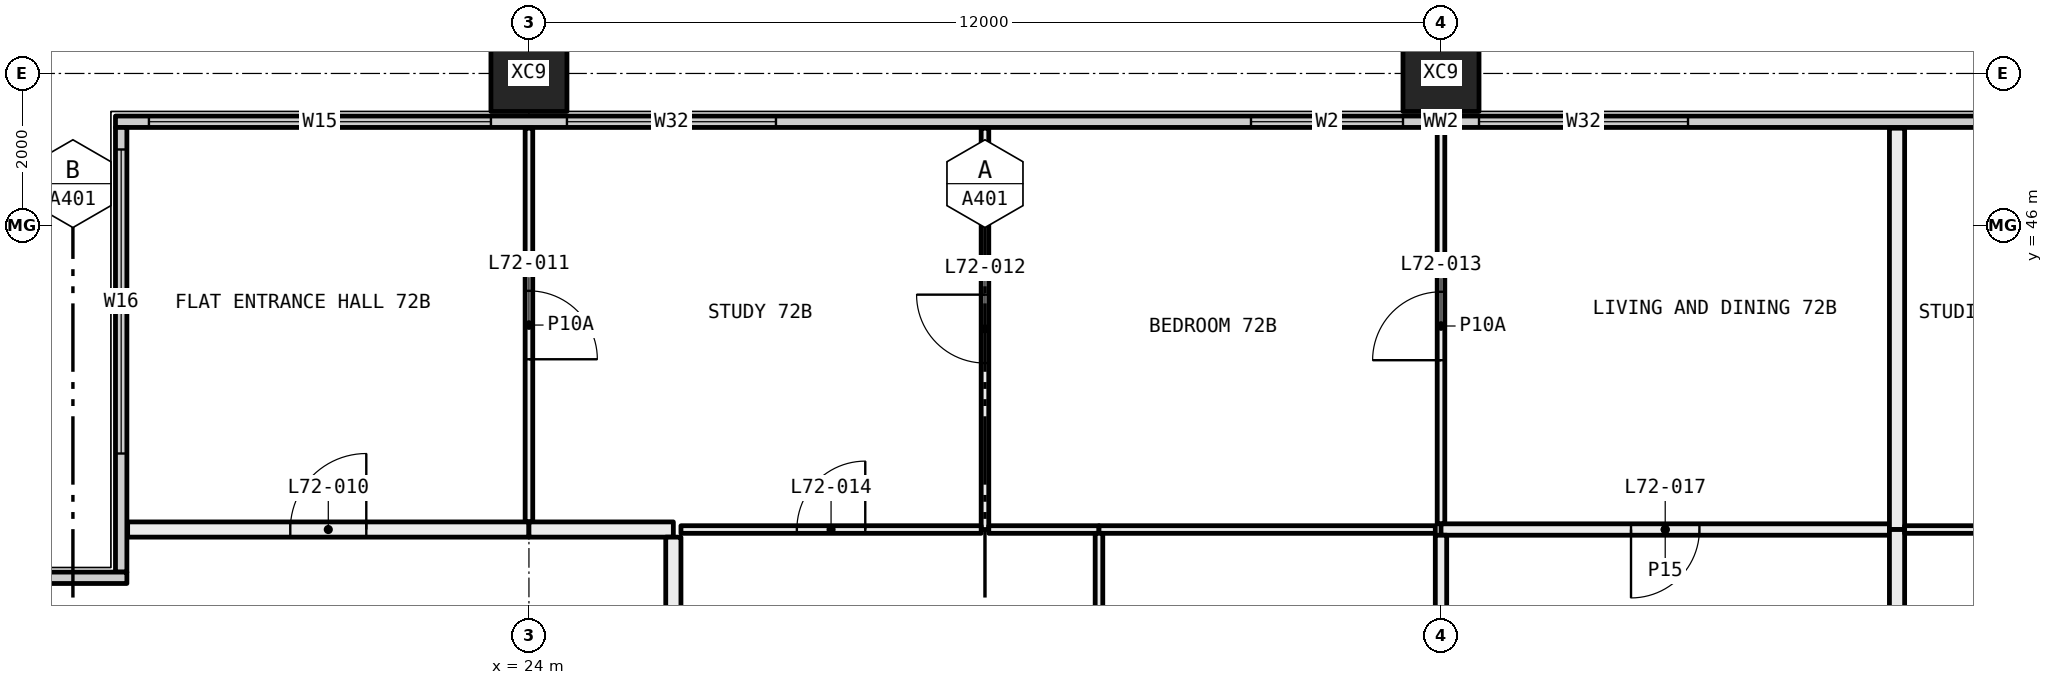
"""IFC4 building model, lengths in metres.
Left out: names, types, materials, properties, quantities, classifications, styles, units other than length and angle.
Written with IfcOpenShell. Run it as: python <this file> out.ifc"""

import sys

from ifc_helpers import new_model, si_unit, direction, frame, frame_2d, origin, origin_2d, place, context, subcontext, project, spatial, rectangle, hollow_rectangle, extrude, element, fill, save


model = new_model("IFC4")
c1 = context("Model", 3, precision=1e-05, world=origin(), true_north=direction((0.0, 1.0)))
c2 = subcontext(c1, "Body", "Model", "MODEL_VIEW")
j1 = project(units=[si_unit("LENGTHUNIT", "METRE"), si_unit("PLANEANGLEUNIT", "RADIAN")], contexts=[c1])
p1 = place(None, origin())
s1 = spatial("IfcSite", under=j1, at=p1, CompositionType="ELEMENT")
p2 = place(p1, origin())
s2 = spatial("IfcBuilding", under=s1, at=p2, CompositionType="ELEMENT")
p3 = place(p2, frame((0.0, 0.0, 266.25)))
s3 = spatial("IfcBuildingStorey", under=s2, at=p3, CompositionType="ELEMENT", Elevation=266.25)
for number, where, z_axis, x_axis in (
    (1, (24.0, 48.0, -0.4), (0.0, 0.0, 1.0), (1.0, 0.0, 0.0)),
    (2, (36.0, 48.0, -0.4), (0.0, 0.0, 1.0), (1.0, 0.0, 0.0)),
):
    element("IfcColumn", number, at=place(p3, frame(where, z_axis=z_axis, x_axis=x_axis)), inside=s3, PredefinedType="COLUMN", context=c2, shape_type="SweptSolid", body=[
        extrude(hollow_rectangle(XDim=1.0, YDim=1.0, WallThickness=0.036, at=origin_2d()), origin(), (0.0, 0.0, 1.0), 3.45),
    ])
p4 = place(p3, frame((18.56, 47.365, 0.0), z_axis=(0.0, 0.0, 1.0), x_axis=(1.0, 0.0, 0.0)))
e3 = element("IfcWall", 3, at=p4, inside=s3, PredefinedType="ELEMENTEDWALL", context=c2, shape_type="SweptSolid", body=[
    extrude(rectangle(XDim=34.88, YDim=0.15, at=frame_2d((17.44, 0.0))), origin(), (0.0, 0.0, 1.0), 3.05),
])
p5 = place(p4, frame((0.44, 0.0, 0.45)))
e4 = element("IfcOpeningElement", 4, at=p5, cuts=e3, PredefinedType="OPENING", context=c2, shape_type="SweptSolid", body=[
    extrude(rectangle(XDim=4.5, YDim=2.55, at=frame_2d((2.25, 1.275))), frame((0.0, 0.085, 0.0), z_axis=(0.0, -1.0, 0.0), x_axis=(1.0, 0.0, 0.0)), (0.0, 0.0, 1.0), 0.17),
])
p6 = place(p4, frame((5.94, 0.0, 0.45)))
e5 = element("IfcOpeningElement", 5, at=p6, cuts=e3, PredefinedType="OPENING", context=c2, shape_type="SweptSolid", body=[
    extrude(rectangle(XDim=2.75, YDim=2.55, at=frame_2d((1.375, 1.275))), frame((0.0, 0.085, 0.0), z_axis=(0.0, -1.0, 0.0), x_axis=(1.0, 0.0, 0.0)), (0.0, 0.0, 1.0), 0.17),
])
p7 = place(p4, frame((14.94, 0.0, 0.45)))
e6 = element("IfcOpeningElement", 6, at=p7, cuts=e3, PredefinedType="OPENING", context=c2, shape_type="SweptSolid", body=[
    extrude(rectangle(XDim=2.0, YDim=2.55, at=frame_2d((1.0, 1.275))), frame((0.0, 0.085, 0.0), z_axis=(0.0, -1.0, 0.0), x_axis=(1.0, 0.0, 0.0)), (0.0, 0.0, 1.0), 0.17),
])
p8 = place(p4, frame((17.94, 0.0, 0.45)))
e7 = element("IfcOpeningElement", 7, at=p8, cuts=e3, PredefinedType="OPENING", context=c2, shape_type="SweptSolid", body=[
    extrude(rectangle(XDim=2.75, YDim=2.55, at=frame_2d((1.375, 1.275))), frame((0.0, 0.085, 0.0), z_axis=(0.0, -1.0, 0.0), x_axis=(1.0, 0.0, 0.0)), (0.0, 0.0, 1.0), 0.17),
])
p9 = place(p4, frame((26.19, 0.0, 0.45)))
e8 = element("IfcOpeningElement", 8, at=p9, cuts=e3, PredefinedType="OPENING", context=c2, shape_type="SweptSolid", body=[
    extrude(rectangle(XDim=2.75, YDim=2.55, at=frame_2d((1.375, 1.275))), frame((0.0, 0.085, 0.0), z_axis=(0.0, -1.0, 0.0), x_axis=(1.0, 0.0, 0.0)), (0.0, 0.0, 1.0), 0.17),
])
p10 = place(p4, frame((29.94, 0.0, 0.45)))
e9 = element("IfcOpeningElement", 9, at=p10, cuts=e3, PredefinedType="OPENING", context=c2, shape_type="SweptSolid", body=[
    extrude(rectangle(XDim=4.5, YDim=2.55, at=frame_2d((2.25, 1.275))), frame((0.0, 0.085, 0.0), z_axis=(0.0, -1.0, 0.0), x_axis=(1.0, 0.0, 0.0)), (0.0, 0.0, 1.0), 0.17),
])
p11 = place(p3, frame((18.635, 41.44, 0.0), z_axis=(0.0, 0.0, 1.0), x_axis=(0.0, 1.0, 0.0)))
e10 = element("IfcWall", 10, at=p11, inside=s3, PredefinedType="ELEMENTEDWALL", context=c2, shape_type="SweptSolid", body=[
    extrude(rectangle(XDim=5.85, YDim=0.15, at=frame_2d((2.925, 0.0))), origin(), (0.0, 0.0, 1.0), 3.05),
])
p12 = place(p11, frame((1.56, 0.0, 0.45)))
e11 = element("IfcOpeningElement", 11, at=p12, cuts=e10, PredefinedType="OPENING", context=c2, shape_type="SweptSolid", body=[
    extrude(rectangle(XDim=4.0, YDim=2.55, at=frame_2d((2.0, 1.275))), frame((0.0, 0.085, 0.0), z_axis=(0.0, -1.0, 0.0), x_axis=(1.0, 0.0, 0.0)), (0.0, 0.0, 1.0), 0.17),
])
p13 = place(p3, frame((12.56, 41.365, 0.0), z_axis=(0.0, 0.0, 1.0), x_axis=(1.0, 0.0, 0.0)))
e12 = element("IfcWall", 12, at=p13, inside=s3, PredefinedType="ELEMENTEDWALL", context=c2, shape_type="SweptSolid", body=[
    extrude(rectangle(XDim=6.15, YDim=0.15, at=frame_2d((3.075, 0.0))), origin(), (0.0, 0.0, 1.0), 3.05),
])
p14 = place(p13, frame((0.44, 0.0, 0.45)))
e13 = element("IfcOpeningElement", 13, at=p14, cuts=e12, PredefinedType="OPENING", context=c2, shape_type="SweptSolid", body=[
    extrude(rectangle(XDim=4.0, YDim=2.55, at=frame_2d((2.0, 1.275))), frame((0.0, 0.085, 0.0), z_axis=(0.0, -1.0, 0.0), x_axis=(1.0, 0.0, 0.0)), (0.0, 0.0, 1.0), 0.17),
])
p15 = place(p3, frame((24.0, 42.1, 0.0), z_axis=(0.0, 0.0, 1.0), x_axis=(0.0, 1.0, 0.0)))
e14 = element("IfcWall", 14, at=p15, inside=s3, PredefinedType="PARTITIONING", context=c2, shape_type="SweptSolid", body=[
    extrude(rectangle(XDim=5.18, YDim=0.1, at=frame_2d((2.59, 0.0))), origin(), (0.0, 0.0, 1.0), 3.05),
])
p16 = place(p15, frame((2.14, 0.0, 0.0)))
e15 = element("IfcOpeningElement", 15, at=p16, cuts=e14, PredefinedType="OPENING", context=c2, shape_type="SweptSolid", body=[
    extrude(rectangle(XDim=0.9, YDim=2.1, at=frame_2d((0.45, 1.05))), frame((0.0, 0.06, 0.0), z_axis=(0.0, -1.0, 0.0), x_axis=(1.0, 0.0, 0.0)), (0.0, 0.0, 1.0), 0.12),
])
p17 = place(p3, frame((18.72, 42.0, 0.0), z_axis=(0.0, 0.0, 1.0), x_axis=(1.0, 0.0, 0.0)))
e16 = element("IfcWall", 16, at=p17, inside=s3, PredefinedType="PARTITIONING", context=c2, shape_type="SweptSolid", body=[
    extrude(rectangle(XDim=5.28, YDim=0.2, at=frame_2d((2.64, 0.0))), origin(), (0.0, 0.0, 1.0), 3.05),
])
p18 = place(p17, frame((2.14, 0.0, 0.0)))
e17 = element("IfcOpeningElement", 17, at=p18, cuts=e16, PredefinedType="OPENING", context=c2, shape_type="SweptSolid", body=[
    extrude(rectangle(XDim=1.0, YDim=2.1, at=frame_2d((0.5, 1.05))), frame((0.0, 0.11, 0.0), z_axis=(0.0, -1.0, 0.0), x_axis=(1.0, 0.0, 0.0)), (0.0, 0.0, 1.0), 0.22),
])
p19 = place(p3, frame((30.0, 42.0, 0.0), z_axis=(0.0, 0.0, 1.0), x_axis=(0.0, 1.0, 0.0)))
e18 = element("IfcWall", 18, at=p19, inside=s3, PredefinedType="PARTITIONING", context=c2, shape_type="SweptSolid", body=[
    extrude(rectangle(XDim=5.28, YDim=0.1, at=frame_2d((2.64, 0.0))), origin(), (0.0, 0.0, 1.0), 3.05),
])
p20 = place(p19, frame((2.19, 0.0, 0.0)))
e19 = element("IfcOpeningElement", 19, at=p20, cuts=e18, PredefinedType="OPENING", context=c2, shape_type="SweptSolid", body=[
    extrude(rectangle(XDim=0.9, YDim=2.1, at=frame_2d((0.45, 1.05))), frame((0.0, 0.06, 0.0), z_axis=(0.0, -1.0, 0.0), x_axis=(1.0, 0.0, 0.0)), (0.0, 0.0, 1.0), 0.12),
])
p21 = place(p3, frame((26.0, 42.0, 0.0), z_axis=(0.0, 0.0, 1.0), x_axis=(1.0, 0.0, 0.0)))
e20 = element("IfcWall", 20, at=p21, inside=s3, PredefinedType="PARTITIONING", context=c2, shape_type="SweptSolid", body=[
    extrude(rectangle(XDim=3.95, YDim=0.1, at=frame_2d((1.975, 0.0))), origin(), (0.0, 0.0, 1.0), 3.05),
])
p22 = place(p21, frame((1.525, 0.0, 0.0)))
e21 = element("IfcOpeningElement", 21, at=p22, cuts=e20, PredefinedType="OPENING", context=c2, shape_type="SweptSolid", body=[
    extrude(rectangle(XDim=0.9, YDim=2.1, at=frame_2d((0.45, 1.05))), frame((0.0, 0.06, 0.0), z_axis=(0.0, -1.0, 0.0), x_axis=(1.0, 0.0, 0.0)), (0.0, 0.0, 1.0), 0.12),
])
p23 = place(p3, frame((24.0, 42.0, 0.0), z_axis=(0.0, 0.0, 1.0), x_axis=(1.0, 0.0, 0.0)))
e22 = element("IfcWall", 22, at=p23, inside=s3, PredefinedType="PARTITIONING", context=c2, shape_type="SweptSolid", body=[
    extrude(rectangle(XDim=1.9, YDim=0.2, at=frame_2d((0.95, 0.0))), origin(), (0.0, 0.0, 1.0), 3.05),
])
p24 = place(p3, frame((36.0, 42.075, 0.0), z_axis=(0.0, 0.0, 1.0), x_axis=(0.0, 1.0, 0.0)))
e23 = element("IfcWall", 23, at=p24, inside=s3, PredefinedType="PARTITIONING", context=c2, shape_type="SweptSolid", body=[
    extrude(rectangle(XDim=5.205, YDim=0.1, at=frame_2d((2.603, 0.0))), origin(), (0.0, 0.0, 1.0), 2.45),
])
p25 = place(p24, frame((2.153, 0.0, 0.0)))
e24 = element("IfcOpeningElement", 24, at=p25, cuts=e23, PredefinedType="OPENING", context=c2, shape_type="SweptSolid", body=[
    extrude(rectangle(XDim=0.9, YDim=2.1, at=frame_2d((0.45, 1.05))), frame((0.0, 0.06, 0.0), z_axis=(0.0, -1.0, 0.0), x_axis=(1.0, 0.0, 0.0)), (0.0, 0.0, 1.0), 0.12),
])
p26 = place(p3, frame((30.05, 42.0, 0.0), z_axis=(0.0, 0.0, 1.0), x_axis=(1.0, 0.0, 0.0)))
e25 = element("IfcWall", 25, at=p26, inside=s3, PredefinedType="PARTITIONING", context=c2, shape_type="SweptSolid", body=[
    extrude(rectangle(XDim=1.45, YDim=0.1, at=frame_2d((0.725, 0.0))), origin(), (0.0, 0.0, 1.0), 3.05),
])
p27 = place(p3, frame((31.5, 42.0, 0.0), z_axis=(0.0, 0.0, 1.0), x_axis=(1.0, 0.0, 0.0)))
e26 = element("IfcWall", 26, at=p27, inside=s3, PredefinedType="PARTITIONING", context=c2, shape_type="SweptSolid", body=[
    extrude(rectangle(XDim=4.425, YDim=0.1, at=frame_2d((2.212, 0.0))), origin(), (0.0, 0.0, 1.0), 2.45),
])
p28 = place(p3, frame((36.0, 42.0, 0.0), z_axis=(0.0, 0.0, 1.0), x_axis=(1.0, 0.0, 0.0)))
e27 = element("IfcWall", 27, at=p28, inside=s3, PredefinedType="PARTITIONING", context=c2, shape_type="SweptSolid", body=[
    extrude(rectangle(XDim=5.9, YDim=0.15, at=frame_2d((2.95, 0.0))), origin(), (0.0, 0.0, 1.0), 2.45),
])
p29 = place(p28, frame((2.5, 0.0, 0.0)))
e28 = element("IfcOpeningElement", 28, at=p29, cuts=e27, PredefinedType="OPENING", context=c2, shape_type="SweptSolid", body=[
    extrude(rectangle(XDim=0.9, YDim=2.1, at=frame_2d((0.45, 1.05))), frame((0.0, 0.085, 0.0), z_axis=(0.0, -1.0, 0.0), x_axis=(1.0, 0.0, 0.0)), (0.0, 0.0, 1.0), 0.17),
])
p30 = place(p3, frame((42.0, 42.0, 0.0), z_axis=(0.0, 0.0, 1.0), x_axis=(0.0, 1.0, 0.0)))
e29 = element("IfcWall", 29, at=p30, inside=s3, PredefinedType="PARTITIONING", context=c2, shape_type="SweptSolid", body=[
    extrude(rectangle(XDim=5.28, YDim=0.2, at=frame_2d((2.64, 0.0))), origin(), (0.0, 0.0, 1.0), 3.05),
])
p31 = place(p3, frame((31.5, 36.1, 0.0), z_axis=(0.0, 0.0, 1.0), x_axis=(0.0, 1.0, 0.0)))
e30 = element("IfcWall", 30, at=p31, inside=s3, PredefinedType="PARTITIONING", context=c2, shape_type="SweptSolid", body=[
    extrude(rectangle(XDim=5.85, YDim=0.1, at=frame_2d((2.925, 0.0))), origin(), (0.0, 0.0, 1.0), 3.05),
])
p32 = place(p31, frame((2.475, 0.0, 0.0)))
e31 = element("IfcOpeningElement", 31, at=p32, cuts=e30, PredefinedType="OPENING", context=c2, shape_type="SweptSolid", body=[
    extrude(rectangle(XDim=0.9, YDim=2.1, at=frame_2d((0.45, 1.05))), frame((0.0, 0.06, 0.0), z_axis=(0.0, -1.0, 0.0), x_axis=(1.0, 0.0, 0.0)), (0.0, 0.0, 1.0), 0.12),
])
p33 = place(p3, frame((25.9, 41.9, 0.0), z_axis=(0.0, 0.0, 1.0), x_axis=(0.0, -1.0, 0.0)))
e32 = element("IfcWall", 32, at=p33, inside=s3, PredefinedType="PARTITIONING", context=c2, shape_type="SweptSolid", body=[
    extrude(rectangle(XDim=6.2, YDim=0.2, at=frame_2d((3.1, 0.0))), origin(), (0.0, 0.0, 1.0), 2.45),
])
p34 = place(p3, frame((36.0, 38.1, 0.0), z_axis=(0.0, 0.0, 1.0), x_axis=(0.0, 1.0, 0.0)))
e33 = element("IfcWall", 33, at=p34, inside=s3, PredefinedType="PARTITIONING", context=c2, shape_type="SweptSolid", body=[
    extrude(rectangle(XDim=3.825, YDim=0.15, at=frame_2d((1.913, 0.0))), origin(), (0.0, 0.0, 1.0), 2.45),
])
p35 = place(p3, frame((42.0, 38.1, 0.0), z_axis=(0.0, 0.0, 1.0), x_axis=(0.0, 1.0, 0.0)))
e34 = element("IfcWall", 34, at=p35, inside=s3, PredefinedType="PARTITIONING", context=c2, shape_type="SweptSolid", body=[
    extrude(rectangle(XDim=3.9, YDim=0.2, at=frame_2d((1.95, 0.0))), origin(), (0.0, 0.0, 1.0), 3.05),
])
p36 = place(p3, frame((42.1, 42.0, 0.0), z_axis=(0.0, 0.0, 1.0), x_axis=(1.0, 0.0, 0.0)))
e35 = element("IfcWall", 35, at=p36, inside=s3, PredefinedType="PARTITIONING", context=c2, shape_type="SweptSolid", body=[
    extrude(rectangle(XDim=3.9, YDim=0.1, at=frame_2d((1.95, 0.0))), origin(), (0.0, 0.0, 1.0), 3.05),
])
p37 = place(p36, frame((1.5, 0.0, 0.0)))
e36 = element("IfcOpeningElement", 36, at=p37, cuts=e35, PredefinedType="OPENING", context=c2, shape_type="SweptSolid", body=[
    extrude(rectangle(XDim=0.9, YDim=2.1, at=frame_2d((0.45, 1.05))), frame((0.0, 0.06, 0.0), z_axis=(0.0, -1.0, 0.0), x_axis=(1.0, 0.0, 0.0)), (0.0, 0.0, 1.0), 0.12),
])
p38 = place(p5, origin())
e37 = element("IfcWindow", 37, at=p38, inside=s3, PartitioningType="SINGLE_PANEL", PredefinedType="WINDOW", context=c2, shape_type="SweptSolid", body=[
    extrude(rectangle(XDim=4.5, YDim=2.55, at=frame_2d((2.25, 1.275))), frame((0.0, 0.03, 0.0), z_axis=(0.0, -1.0, 0.0), x_axis=(1.0, 0.0, 0.0)), (0.0, 0.0, 1.0), 0.06),
])
fill(e4, e37)
p39 = place(p6, origin())
e38 = element("IfcWindow", 38, at=p39, inside=s3, PartitioningType="SINGLE_PANEL", PredefinedType="WINDOW", context=c2, shape_type="SweptSolid", body=[
    extrude(rectangle(XDim=2.75, YDim=2.55, at=frame_2d((1.375, 1.275))), frame((0.0, 0.03, 0.0), z_axis=(0.0, -1.0, 0.0), x_axis=(1.0, 0.0, 0.0)), (0.0, 0.0, 1.0), 0.06),
])
fill(e5, e38)
p40 = place(p7, origin())
e39 = element("IfcWindow", 39, at=p40, inside=s3, PartitioningType="SINGLE_PANEL", PredefinedType="WINDOW", context=c2, shape_type="SweptSolid", body=[
    extrude(rectangle(XDim=2.0, YDim=2.55, at=frame_2d((1.0, 1.275))), frame((0.0, 0.03, 0.0), z_axis=(0.0, -1.0, 0.0), x_axis=(1.0, 0.0, 0.0)), (0.0, 0.0, 1.0), 0.06),
])
fill(e6, e39)
p41 = place(p8, origin())
e40 = element("IfcWindow", 40, at=p41, inside=s3, PartitioningType="SINGLE_PANEL", PredefinedType="WINDOW", context=c2, shape_type="SweptSolid", body=[
    extrude(rectangle(XDim=2.75, YDim=2.55, at=frame_2d((1.375, 1.275))), frame((0.0, 0.03, 0.0), z_axis=(0.0, -1.0, 0.0), x_axis=(1.0, 0.0, 0.0)), (0.0, 0.0, 1.0), 0.06),
])
fill(e7, e40)
p42 = place(p12, origin())
e41 = element("IfcWindow", 41, at=p42, inside=s3, PartitioningType="SINGLE_PANEL", PredefinedType="WINDOW", context=c2, shape_type="SweptSolid", body=[
    extrude(rectangle(XDim=4.0, YDim=2.55, at=frame_2d((2.0, 1.275))), frame((0.0, 0.03, 0.0), z_axis=(0.0, -1.0, 0.0), x_axis=(1.0, 0.0, 0.0)), (0.0, 0.0, 1.0), 0.06),
])
fill(e11, e41)
p43 = place(p18, origin())
e42 = element("IfcDoor", 42, at=p43, inside=s3, OperationType="SINGLE_SWING_LEFT", PredefinedType="DOOR", context=c2, shape_type="SweptSolid", body=[
    extrude(rectangle(XDim=1.0, YDim=2.1, at=frame_2d((0.5, 1.05))), frame((0.0, 0.025, 0.0), z_axis=(0.0, -1.0, 0.0), x_axis=(1.0, 0.0, 0.0)), (0.0, 0.0, 1.0), 0.05),
])
fill(e17, e42)
p44 = place(p16, frame((0.9, 0.0, 0.0), x_axis=(-1.0, 0.0, 0.0)))
e43 = element("IfcDoor", 43, at=p44, inside=s3, OperationType="SINGLE_SWING_LEFT", PredefinedType="DOOR", context=c2, shape_type="SweptSolid", body=[
    extrude(rectangle(XDim=0.9, YDim=2.1, at=frame_2d((0.45, 1.05))), frame((0.0, 0.025, 0.0), z_axis=(0.0, -1.0, 0.0), x_axis=(1.0, 0.0, 0.0)), (0.0, 0.0, 1.0), 0.05),
])
fill(e15, e43)
p45 = place(p20, origin())
e44 = element("IfcDoor", 44, at=p45, inside=s3, OperationType="SINGLE_SWING_LEFT", PredefinedType="DOOR", context=c2, shape_type="SweptSolid", body=[
    extrude(rectangle(XDim=0.9, YDim=2.1, at=frame_2d((0.45, 1.05))), frame((0.0, 0.025, 0.0), z_axis=(0.0, -1.0, 0.0), x_axis=(1.0, 0.0, 0.0)), (0.0, 0.0, 1.0), 0.05),
])
fill(e19, e44)
p46 = place(p25, origin())
e45 = element("IfcDoor", 45, at=p46, inside=s3, OperationType="SINGLE_SWING_RIGHT", PredefinedType="DOOR", context=c2, shape_type="SweptSolid", body=[
    extrude(rectangle(XDim=0.9, YDim=2.1, at=frame_2d((0.45, 1.05))), frame((0.0, 0.025, 0.0), z_axis=(0.0, -1.0, 0.0), x_axis=(1.0, 0.0, 0.0)), (0.0, 0.0, 1.0), 0.05),
])
fill(e24, e45)
p47 = place(p22, origin())
e46 = element("IfcDoor", 46, at=p47, inside=s3, OperationType="SINGLE_SWING_LEFT", PredefinedType="DOOR", context=c2, shape_type="SweptSolid", body=[
    extrude(rectangle(XDim=0.9, YDim=2.1, at=frame_2d((0.45, 1.05))), frame((0.0, 0.025, 0.0), z_axis=(0.0, -1.0, 0.0), x_axis=(1.0, 0.0, 0.0)), (0.0, 0.0, 1.0), 0.05),
])
fill(e21, e46)
p48 = place(p29, frame((0.9, 0.0, 0.0), x_axis=(-1.0, 0.0, 0.0)))
e47 = element("IfcDoor", 47, at=p48, inside=s3, OperationType="SINGLE_SWING_LEFT", PredefinedType="DOOR", context=c2, shape_type="SweptSolid", body=[
    extrude(rectangle(XDim=0.9, YDim=2.1, at=frame_2d((0.45, 1.05))), frame((0.0, 0.025, 0.0), z_axis=(0.0, -1.0, 0.0), x_axis=(1.0, 0.0, 0.0)), (0.0, 0.0, 1.0), 0.05),
])
fill(e28, e47)
save(model, sys.argv[1])
